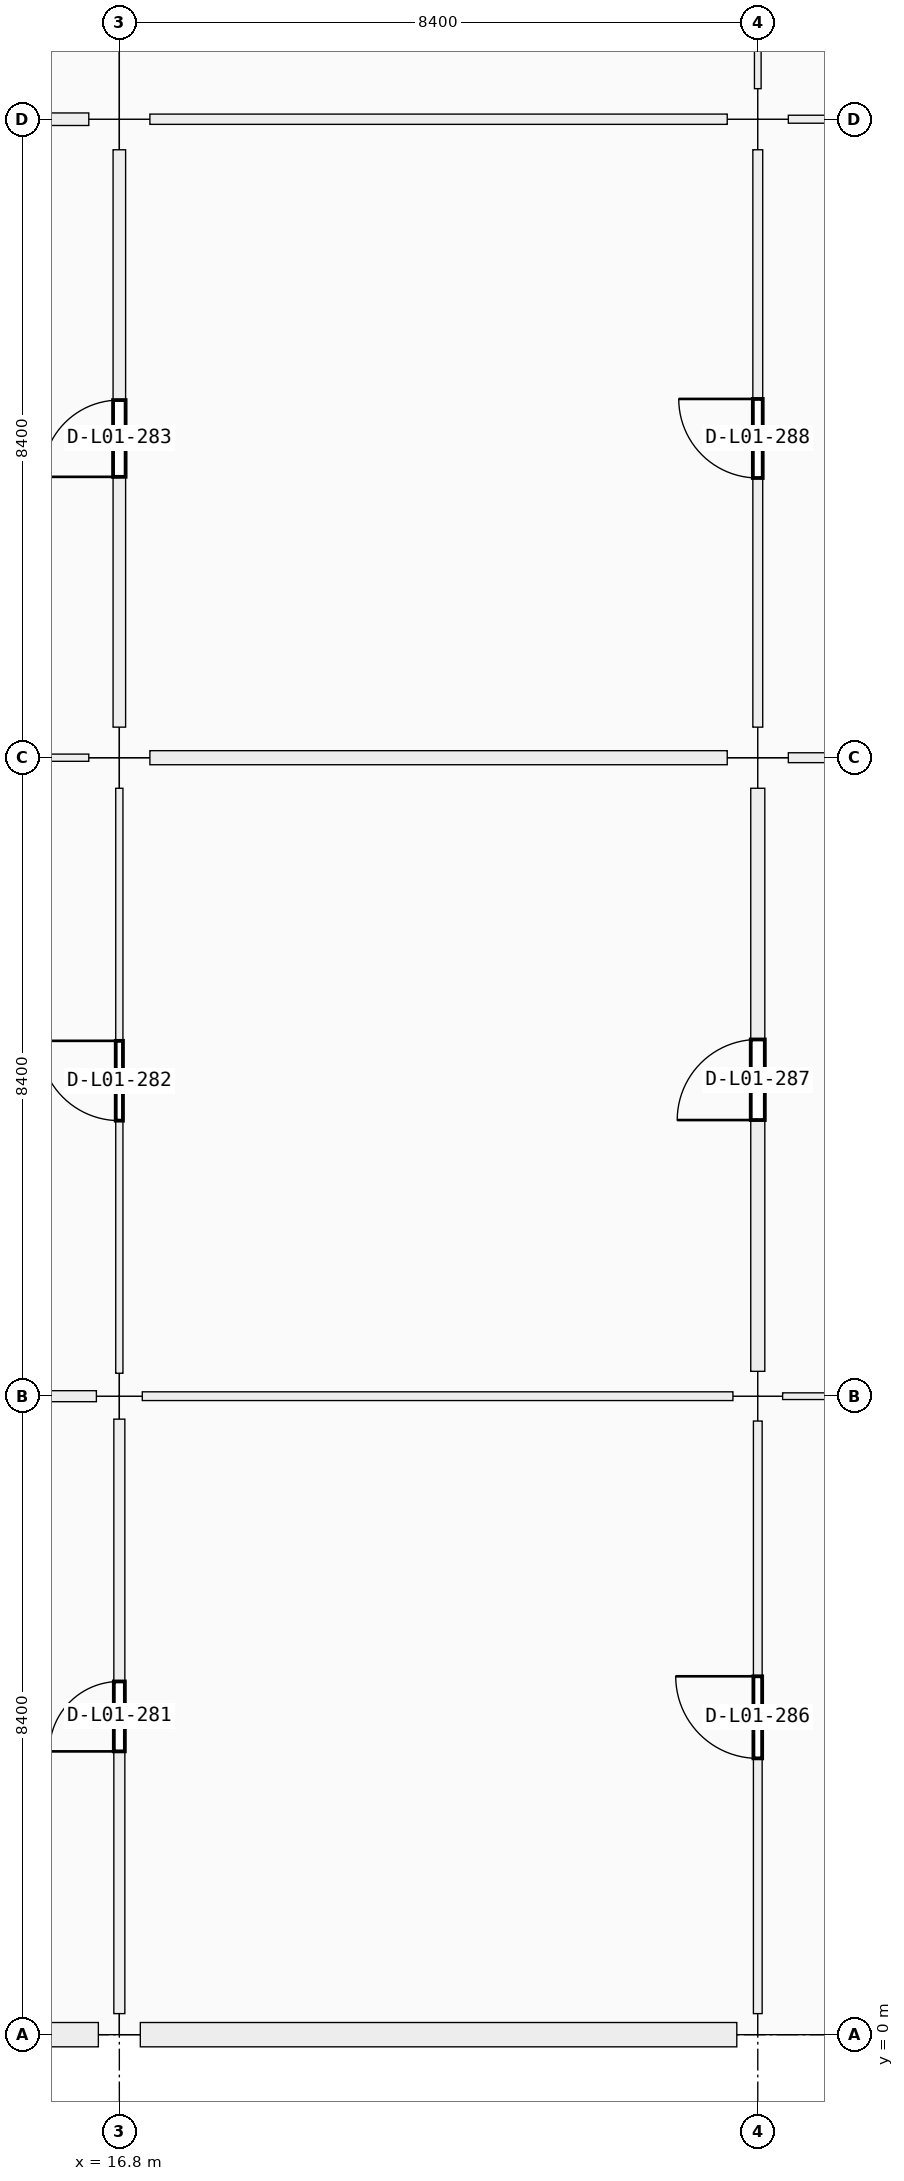
"""IFC4 building model, lengths in metres.
Left out: names, types, materials, properties, quantities, classifications, styles, units other than length and angle.
Written with IfcOpenShell. Run it as: python <this file> out.ifc"""

import sys

from ifc_helpers import new_model, si_unit, direction, frame, frame_2d, origin, origin_2d, place, context, subcontext, project, spatial, rectangle, extrude, element, fill, save


model = new_model("IFC4")
c1 = context("Model", 3, precision=1e-05, world=origin(), true_north=direction((0.0, 1.0)))
c2 = subcontext(c1, "Body", "Model", "MODEL_VIEW")
j1 = project(units=[si_unit("LENGTHUNIT", "METRE"), si_unit("PLANEANGLEUNIT", "RADIAN")], contexts=[c1])
p1 = place(None, origin())
s1 = spatial("IfcSite", under=j1, at=p1, CompositionType="ELEMENT")
p2 = place(p1, origin())
s2 = spatial("IfcBuilding", under=s1, at=p2, CompositionType="ELEMENT")
p3 = place(p2, frame((0.0, 0.0, 5.76)))
s3 = spatial("IfcBuildingStorey", under=s2, at=p3, CompositionType="ELEMENT", Elevation=5.76)
p4 = place(p3, frame((16.8, 0.0, 0.0), z_axis=(0.0, 0.0, 1.0), x_axis=(1.0, 0.0, 0.0)))
e1 = element("IfcColumn", 1, at=p4, inside=s3, PredefinedType="COLUMN", context=c2, shape_type="SweptSolid", body=[
    extrude(rectangle(XDim=0.55, YDim=0.55, at=origin_2d()), origin(), (0.0, 0.0, 1.0), 4.2),
])
p5 = place(p3, frame((16.8, 8.4, 0.0), z_axis=(0.0, 0.0, 1.0), x_axis=(1.0, 0.0, 0.0)))
e2 = element("IfcColumn", 2, at=p5, inside=s3, PredefinedType="COLUMN", context=c2, shape_type="SweptSolid", body=[
    extrude(rectangle(XDim=0.6, YDim=0.6, at=origin_2d()), origin(), (0.0, 0.0, 1.0), 4.5),
])
for number, where, z_axis, x_axis in (
    (3, (16.8, 16.8, 0.0), (0.0, 0.0, 1.0), (1.0, 0.0, 0.0)),
    (4, (16.8, 25.2, 0.0), (0.0, 0.0, 1.0), (1.0, 0.0, 0.0)),
):
    element("IfcColumn", number, at=place(p3, frame(where, z_axis=z_axis, x_axis=x_axis)), inside=s3, PredefinedType="COLUMN", context=c2, shape_type="SweptSolid", body=[
        extrude(rectangle(XDim=0.8, YDim=0.8, at=origin_2d()), origin(), (0.0, 0.0, 1.0), 4.5),
    ])
p6 = place(p3, frame((25.2, 0.0, 0.0), z_axis=(0.0, 0.0, 1.0), x_axis=(1.0, 0.0, 0.0)))
e5 = element("IfcColumn", 5, at=p6, inside=s3, PredefinedType="COLUMN", context=c2, shape_type="SweptSolid", body=[
    extrude(rectangle(XDim=0.55, YDim=0.55, at=origin_2d()), origin(), (0.0, 0.0, 1.0), 4.2),
])
p7 = place(p3, frame((25.2, 8.4, 0.0), z_axis=(0.0, 0.0, 1.0), x_axis=(1.0, 0.0, 0.0)))
e6 = element("IfcColumn", 6, at=p7, inside=s3, PredefinedType="COLUMN", context=c2, shape_type="SweptSolid", body=[
    extrude(rectangle(XDim=0.65, YDim=0.65, at=origin_2d()), origin(), (0.0, 0.0, 1.0), 4.5),
])
for number, where, z_axis, x_axis in (
    (7, (25.2, 16.8, 0.0), (0.0, 0.0, 1.0), (1.0, 0.0, 0.0)),
    (8, (25.2, 25.2, 0.0), (0.0, 0.0, 1.0), (1.0, 0.0, 0.0)),
):
    element("IfcColumn", number, at=place(p3, frame(where, z_axis=z_axis, x_axis=x_axis)), inside=s3, PredefinedType="COLUMN", context=c2, shape_type="SweptSolid", body=[
        extrude(rectangle(XDim=0.8, YDim=0.8, at=origin_2d()), origin(), (0.0, 0.0, 1.0), 4.5),
    ])
p8 = place(p3, frame((16.524, 0.0, 0.0), z_axis=(0.0, 0.0, 1.0), x_axis=(-1.0, 0.0, 0.0)))
e9 = element("IfcWall", 9, at=p8, inside=s3, PredefinedType="SOLIDWALL", context=c2, shape_type="SweptSolid", body=[
    extrude(rectangle(XDim=7.848, YDim=0.32, at=frame_2d((3.924, 0.0))), origin(), (0.0, 0.0, 1.0), 3.4),
])
p9 = place(p8, frame((3.249, 0.0, 0.9)))
e10 = element("IfcOpeningElement", 10, at=p9, cuts=e9, PredefinedType="OPENING", context=c2, shape_type="SweptSolid", body=[
    extrude(rectangle(XDim=1.35, YDim=1.5, at=frame_2d((0.675, 0.75))), frame((0.0, 0.16, 0.0), z_axis=(0.0, -1.0, 0.0), x_axis=(1.0, 0.0, 0.0)), (0.0, 0.0, 1.0), 0.32),
])
p10 = place(p3, frame((24.924, 0.0, 0.0), z_axis=(0.0, 0.0, 1.0), x_axis=(-1.0, 0.0, 0.0)))
e11 = element("IfcWall", 11, at=p10, inside=s3, PredefinedType="SOLIDWALL", context=c2, shape_type="SweptSolid", body=[
    extrude(rectangle(XDim=7.848, YDim=0.32, at=frame_2d((3.924, 0.0))), origin(), (0.0, 0.0, 1.0), 3.4),
])
p11 = place(p10, frame((3.374, 0.0, 0.9)))
e12 = element("IfcOpeningElement", 12, at=p11, cuts=e11, PredefinedType="OPENING", context=c2, shape_type="SweptSolid", body=[
    extrude(rectangle(XDim=1.1, YDim=1.5, at=frame_2d((0.55, 0.75))), frame((0.0, 0.16, 0.0), z_axis=(0.0, -1.0, 0.0), x_axis=(1.0, 0.0, 0.0)), (0.0, 0.0, 1.0), 0.32),
])
p12 = place(p3, frame((8.727, 8.4, 0.0), z_axis=(0.0, 0.0, 1.0), x_axis=(1.0, 0.0, 0.0)))
e13 = element("IfcWall", 13, at=p12, inside=s3, PredefinedType="PARTITIONING", context=c2, shape_type="SweptSolid", body=[
    extrude(rectangle(XDim=7.771, YDim=0.145, at=frame_2d((3.885, 0.0))), origin(), (0.0, 0.0, 1.0), 2.4),
])
p13 = place(p12, frame((3.415, 0.0, 0.0)))
e14 = element("IfcOpeningElement", 14, at=p13, cuts=e13, PredefinedType="OPENING", context=c2, shape_type="SweptSolid", body=[
    extrude(rectangle(XDim=0.94, YDim=2.15, at=frame_2d((0.47, 1.075))), frame((0.0, 0.073, 0.0), z_axis=(0.0, -1.0, 0.0), x_axis=(1.0, 0.0, 0.0)), (0.0, 0.0, 1.0), 0.145),
])
p14 = place(p3, frame((8.802, 16.8, 0.0), z_axis=(0.0, 0.0, 1.0), x_axis=(1.0, 0.0, 0.0)))
e15 = element("IfcWall", 15, at=p14, inside=s3, PredefinedType="PARTITIONING", context=c2, shape_type="SweptSolid", body=[
    extrude(rectangle(XDim=7.596, YDim=0.095, at=frame_2d((3.798, 0.0))), origin(), (0.0, 0.0, 1.0), 2.4),
])
p15 = place(p14, frame((3.258, 0.0, 0.0)))
e16 = element("IfcOpeningElement", 16, at=p15, cuts=e15, PredefinedType="OPENING", context=c2, shape_type="SweptSolid", body=[
    extrude(rectangle(XDim=1.08, YDim=2.22, at=frame_2d((0.54, 1.11))), frame((0.0, 0.047, 0.0), z_axis=(0.0, -1.0, 0.0), x_axis=(1.0, 0.0, 0.0)), (0.0, 0.0, 1.0), 0.095),
])
p16 = place(p3, frame((8.802, 25.2, 0.0), z_axis=(0.0, 0.0, 1.0), x_axis=(1.0, 0.0, 0.0)))
e17 = element("IfcWall", 17, at=p16, inside=s3, PredefinedType="PARTITIONING", context=c2, shape_type="SweptSolid", body=[
    extrude(rectangle(XDim=7.596, YDim=0.165, at=frame_2d((3.798, 0.0))), origin(), (0.0, 0.0, 1.0), 2.4),
])
p17 = place(p16, frame((3.318, 0.0, 0.0)))
e18 = element("IfcOpeningElement", 18, at=p17, cuts=e17, PredefinedType="OPENING", context=c2, shape_type="SweptSolid", body=[
    extrude(rectangle(XDim=0.96, YDim=2.18, at=frame_2d((0.48, 1.09))), frame((0.0, 0.083, 0.0), z_axis=(0.0, -1.0, 0.0), x_axis=(1.0, 0.0, 0.0)), (0.0, 0.0, 1.0), 0.165),
])
p18 = place(p3, frame((17.102, 8.4, 0.0), z_axis=(0.0, 0.0, 1.0), x_axis=(1.0, 0.0, 0.0)))
e19 = element("IfcWall", 19, at=p18, inside=s3, PredefinedType="PARTITIONING", context=c2, shape_type="SweptSolid", body=[
    extrude(rectangle(XDim=7.771, YDim=0.115, at=frame_2d((3.885, 0.0))), origin(), (0.0, 0.0, 1.0), 2.4),
])
p19 = place(p18, frame((3.361, 0.0, 0.0)))
e20 = element("IfcOpeningElement", 20, at=p19, cuts=e19, PredefinedType="OPENING", context=c2, shape_type="SweptSolid", body=[
    extrude(rectangle(XDim=1.05, YDim=2.12, at=frame_2d((0.525, 1.06))), frame((0.0, 0.058, 0.0), z_axis=(0.0, -1.0, 0.0), x_axis=(1.0, 0.0, 0.0)), (0.0, 0.0, 1.0), 0.115),
])
p20 = place(p3, frame((17.202, 16.8, 0.0), z_axis=(0.0, 0.0, 1.0), x_axis=(1.0, 0.0, 0.0)))
e21 = element("IfcWall", 21, at=p20, inside=s3, PredefinedType="PARTITIONING", context=c2, shape_type="SweptSolid", body=[
    extrude(rectangle(XDim=7.596, YDim=0.185, at=frame_2d((3.798, 0.0))), origin(), (0.0, 0.0, 1.0), 2.4),
])
p21 = place(p20, frame((3.268, 0.0, 0.0)))
e22 = element("IfcOpeningElement", 22, at=p21, cuts=e21, PredefinedType="OPENING", context=c2, shape_type="SweptSolid", body=[
    extrude(rectangle(XDim=1.06, YDim=2.22, at=frame_2d((0.53, 1.11))), frame((0.0, 0.093, 0.0), z_axis=(0.0, -1.0, 0.0), x_axis=(1.0, 0.0, 0.0)), (0.0, 0.0, 1.0), 0.185),
])
p22 = place(p3, frame((17.202, 25.2, 0.0), z_axis=(0.0, 0.0, 1.0), x_axis=(1.0, 0.0, 0.0)))
e23 = element("IfcWall", 23, at=p22, inside=s3, PredefinedType="PARTITIONING", context=c2, shape_type="SweptSolid", body=[
    extrude(rectangle(XDim=7.596, YDim=0.135, at=frame_2d((3.798, 0.0))), origin(), (0.0, 0.0, 1.0), 2.4),
])
p23 = place(p22, frame((3.338, 0.0, 0.0)))
e24 = element("IfcOpeningElement", 24, at=p23, cuts=e23, PredefinedType="OPENING", context=c2, shape_type="SweptSolid", body=[
    extrude(rectangle(XDim=0.92, YDim=2.15, at=frame_2d((0.46, 1.075))), frame((0.0, 0.067, 0.0), z_axis=(0.0, -1.0, 0.0), x_axis=(1.0, 0.0, 0.0)), (0.0, 0.0, 1.0), 0.135),
])
p24 = place(p3, frame((25.527, 8.4, 0.0), z_axis=(0.0, 0.0, 1.0), x_axis=(1.0, 0.0, 0.0)))
e25 = element("IfcWall", 25, at=p24, inside=s3, PredefinedType="PARTITIONING", context=c2, shape_type="SweptSolid", body=[
    extrude(rectangle(XDim=7.771, YDim=0.088, at=frame_2d((3.885, 0.0))), origin(), (0.0, 0.0, 1.0), 2.4),
])
p25 = place(p24, frame((3.381, 0.0, 0.0)))
e26 = element("IfcOpeningElement", 26, at=p25, cuts=e25, PredefinedType="OPENING", context=c2, shape_type="SweptSolid", body=[
    extrude(rectangle(XDim=1.01, YDim=2.12, at=frame_2d((0.505, 1.06))), frame((0.0, 0.044, 0.0), z_axis=(0.0, -1.0, 0.0), x_axis=(1.0, 0.0, 0.0)), (0.0, 0.0, 1.0), 0.088),
])
p26 = place(p3, frame((25.602, 16.8, 0.0), z_axis=(0.0, 0.0, 1.0), x_axis=(1.0, 0.0, 0.0)))
e27 = element("IfcWall", 27, at=p26, inside=s3, PredefinedType="MOVABLE", context=c2, shape_type="SweptSolid", body=[
    extrude(rectangle(XDim=7.596, YDim=0.13, at=frame_2d((3.798, 0.0))), origin(), (0.0, 0.0, 1.0), 2.4),
])
p27 = place(p26, frame((3.313, 0.0, 0.0)))
e28 = element("IfcOpeningElement", 28, at=p27, cuts=e27, PredefinedType="OPENING", context=c2, shape_type="SweptSolid", body=[
    extrude(rectangle(XDim=0.97, YDim=2.12, at=frame_2d((0.485, 1.06))), frame((0.0, 0.065, 0.0), z_axis=(0.0, -1.0, 0.0), x_axis=(1.0, 0.0, 0.0)), (0.0, 0.0, 1.0), 0.13),
])
p28 = place(p3, frame((25.602, 25.2, 0.0), z_axis=(0.0, 0.0, 1.0), x_axis=(1.0, 0.0, 0.0)))
e29 = element("IfcWall", 29, at=p28, inside=s3, PredefinedType="PARTITIONING", context=c2, shape_type="SweptSolid", body=[
    extrude(rectangle(XDim=7.596, YDim=0.105, at=frame_2d((3.798, 0.0))), origin(), (0.0, 0.0, 1.0), 2.4),
])
p29 = place(p28, frame((3.278, 0.0, 0.0)))
e30 = element("IfcOpeningElement", 30, at=p29, cuts=e29, PredefinedType="OPENING", context=c2, shape_type="SweptSolid", body=[
    extrude(rectangle(XDim=1.04, YDim=2.2, at=frame_2d((0.52, 1.1))), frame((0.0, 0.052, 0.0), z_axis=(0.0, -1.0, 0.0), x_axis=(1.0, 0.0, 0.0)), (0.0, 0.0, 1.0), 0.105),
])
p30 = place(p3, frame((16.8, 0.277, 0.0), z_axis=(0.0, 0.0, 1.0), x_axis=(0.0, 1.0, 0.0)))
e31 = element("IfcWall", 31, at=p30, inside=s3, PredefinedType="PARTITIONING", context=c2, shape_type="SweptSolid", body=[
    extrude(rectangle(XDim=7.821, YDim=0.145, at=frame_2d((3.91, 0.0))), origin(), (0.0, 0.0, 1.0), 2.4),
])
p31 = place(p30, frame((3.45, 0.0, 0.0)))
e32 = element("IfcOpeningElement", 32, at=p31, cuts=e31, PredefinedType="OPENING", context=c2, shape_type="SweptSolid", body=[
    extrude(rectangle(XDim=0.92, YDim=2.15, at=frame_2d((0.46, 1.075))), frame((0.0, 0.073, 0.0), z_axis=(0.0, -1.0, 0.0), x_axis=(1.0, 0.0, 0.0)), (0.0, 0.0, 1.0), 0.145),
])
p32 = place(p3, frame((16.8, 8.702, 0.0), z_axis=(0.0, 0.0, 1.0), x_axis=(0.0, 1.0, 0.0)))
e33 = element("IfcWall", 33, at=p32, inside=s3, PredefinedType="PARTITIONING", context=c2, shape_type="SweptSolid", body=[
    extrude(rectangle(XDim=7.696, YDim=0.095, at=frame_2d((3.848, 0.0))), origin(), (0.0, 0.0, 1.0), 2.4),
])
p33 = place(p32, frame((3.323, 0.0, 0.0)))
e34 = element("IfcOpeningElement", 34, at=p33, cuts=e33, PredefinedType="OPENING", context=c2, shape_type="SweptSolid", body=[
    extrude(rectangle(XDim=1.05, YDim=2.12, at=frame_2d((0.525, 1.06))), frame((0.0, 0.047, 0.0), z_axis=(0.0, -1.0, 0.0), x_axis=(1.0, 0.0, 0.0)), (0.0, 0.0, 1.0), 0.095),
])
p34 = place(p3, frame((16.8, 17.202, 0.0), z_axis=(0.0, 0.0, 1.0), x_axis=(0.0, 1.0, 0.0)))
e35 = element("IfcWall", 35, at=p34, inside=s3, PredefinedType="PARTITIONING", context=c2, shape_type="SweptSolid", body=[
    extrude(rectangle(XDim=7.596, YDim=0.165, at=frame_2d((3.798, 0.0))), origin(), (0.0, 0.0, 1.0), 2.4),
])
p35 = place(p34, frame((3.293, 0.0, 0.0)))
e36 = element("IfcOpeningElement", 36, at=p35, cuts=e35, PredefinedType="OPENING", context=c2, shape_type="SweptSolid", body=[
    extrude(rectangle(XDim=1.01, YDim=2.12, at=frame_2d((0.505, 1.06))), frame((0.0, 0.083, 0.0), z_axis=(0.0, -1.0, 0.0), x_axis=(1.0, 0.0, 0.0)), (0.0, 0.0, 1.0), 0.165),
])
p36 = place(p3, frame((25.2, 0.277, 0.0), z_axis=(0.0, 0.0, 1.0), x_axis=(0.0, 1.0, 0.0)))
e37 = element("IfcWall", 37, at=p36, inside=s3, PredefinedType="PARTITIONING", context=c2, shape_type="SweptSolid", body=[
    extrude(rectangle(XDim=7.796, YDim=0.115, at=frame_2d((3.898, 0.0))), origin(), (0.0, 0.0, 1.0), 2.4),
])
p37 = place(p36, frame((3.358, 0.0, 0.0)))
e38 = element("IfcOpeningElement", 38, at=p37, cuts=e37, PredefinedType="OPENING", context=c2, shape_type="SweptSolid", body=[
    extrude(rectangle(XDim=1.08, YDim=2.22, at=frame_2d((0.54, 1.11))), frame((0.0, 0.058, 0.0), z_axis=(0.0, -1.0, 0.0), x_axis=(1.0, 0.0, 0.0)), (0.0, 0.0, 1.0), 0.115),
])
p38 = place(p3, frame((25.2, 8.727, 0.0), z_axis=(0.0, 0.0, 1.0), x_axis=(0.0, 1.0, 0.0)))
e39 = element("IfcWall", 39, at=p38, inside=s3, PredefinedType="PARTITIONING", context=c2, shape_type="SweptSolid", body=[
    extrude(rectangle(XDim=7.671, YDim=0.185, at=frame_2d((3.835, 0.0))), origin(), (0.0, 0.0, 1.0), 2.4),
])
p39 = place(p38, frame((3.306, 0.0, 0.0)))
e40 = element("IfcOpeningElement", 40, at=p39, cuts=e39, PredefinedType="OPENING", context=c2, shape_type="SweptSolid", body=[
    extrude(rectangle(XDim=1.06, YDim=2.22, at=frame_2d((0.53, 1.11))), frame((0.0, 0.093, 0.0), z_axis=(0.0, -1.0, 0.0), x_axis=(1.0, 0.0, 0.0)), (0.0, 0.0, 1.0), 0.185),
])
p40 = place(p3, frame((25.2, 17.202, 0.0), z_axis=(0.0, 0.0, 1.0), x_axis=(0.0, 1.0, 0.0)))
e41 = element("IfcWall", 41, at=p40, inside=s3, PredefinedType="MOVABLE", context=c2, shape_type="SweptSolid", body=[
    extrude(rectangle(XDim=7.596, YDim=0.13, at=frame_2d((3.798, 0.0))), origin(), (0.0, 0.0, 1.0), 2.4),
])
p41 = place(p40, frame((3.278, 0.0, 0.0)))
e42 = element("IfcOpeningElement", 42, at=p41, cuts=e41, PredefinedType="OPENING", context=c2, shape_type="SweptSolid", body=[
    extrude(rectangle(XDim=1.04, YDim=2.2, at=frame_2d((0.52, 1.1))), frame((0.0, 0.065, 0.0), z_axis=(0.0, -1.0, 0.0), x_axis=(1.0, 0.0, 0.0)), (0.0, 0.0, 1.0), 0.13),
])
p42 = place(p3, frame((25.2, 25.602, 0.0), z_axis=(0.0, 0.0, 1.0), x_axis=(0.0, 1.0, 0.0)))
e43 = element("IfcWall", 43, at=p42, inside=s3, PredefinedType="PARTITIONING", context=c2, shape_type="SweptSolid", body=[
    extrude(rectangle(XDim=7.596, YDim=0.088, at=frame_2d((3.798, 0.0))), origin(), (0.0, 0.0, 1.0), 2.4),
])
p43 = place(p42, frame((3.268, 0.0, 0.0)))
e44 = element("IfcOpeningElement", 44, at=p43, cuts=e43, PredefinedType="OPENING", context=c2, shape_type="SweptSolid", body=[
    extrude(rectangle(XDim=1.06, YDim=2.22, at=frame_2d((0.53, 1.11))), frame((0.0, 0.044, 0.0), z_axis=(0.0, -1.0, 0.0), x_axis=(1.0, 0.0, 0.0)), (0.0, 0.0, 1.0), 0.088),
])
p44 = place(p11, origin())
e45 = element("IfcWindow", 45, at=p44, inside=s3, PartitioningType="SINGLE_PANEL", PredefinedType="WINDOW", context=c2, shape_type="SweptSolid", body=[
    extrude(rectangle(XDim=1.1, YDim=1.5, at=frame_2d((0.55, 0.75))), frame((0.0, 0.03, 0.0), z_axis=(0.0, -1.0, 0.0), x_axis=(1.0, 0.0, 0.0)), (0.0, 0.0, 1.0), 0.06),
])
fill(e12, e45)
p45 = place(p23, origin())
e46 = element("IfcDoor", 46, at=p45, inside=s3, OperationType="SINGLE_SWING_RIGHT", PredefinedType="DOOR", context=c2, shape_type="SweptSolid", body=[
    extrude(rectangle(XDim=0.92, YDim=2.15, at=frame_2d((0.46, 1.075))), frame((0.0, 0.025, 0.0), z_axis=(0.0, -1.0, 0.0), x_axis=(1.0, 0.0, 0.0)), (0.0, 0.0, 1.0), 0.05),
])
fill(e24, e46)
p46 = place(p19, origin())
e47 = element("IfcDoor", 47, at=p46, inside=s3, OperationType="SINGLE_SWING_RIGHT", PredefinedType="DOOR", context=c2, shape_type="SweptSolid", body=[
    extrude(rectangle(XDim=1.05, YDim=2.12, at=frame_2d((0.525, 1.06))), frame((0.0, 0.025, 0.0), z_axis=(0.0, -1.0, 0.0), x_axis=(1.0, 0.0, 0.0)), (0.0, 0.0, 1.0), 0.05),
])
fill(e20, e47)
p47 = place(p21, origin())
e48 = element("IfcDoor", 48, at=p47, inside=s3, OperationType="SINGLE_SWING_LEFT", PredefinedType="DOOR", context=c2, shape_type="SweptSolid", body=[
    extrude(rectangle(XDim=1.06, YDim=2.22, at=frame_2d((0.53, 1.11))), frame((0.0, 0.025, 0.0), z_axis=(0.0, -1.0, 0.0), x_axis=(1.0, 0.0, 0.0)), (0.0, 0.0, 1.0), 0.05),
])
fill(e22, e48)
p48 = place(p31, origin())
e49 = element("IfcDoor", 49, at=p48, inside=s3, OperationType="SINGLE_SWING_LEFT", PredefinedType="DOOR", context=c2, shape_type="SweptSolid", body=[
    extrude(rectangle(XDim=0.92, YDim=2.15, at=frame_2d((0.46, 1.075))), frame((0.0, 0.025, 0.0), z_axis=(0.0, -1.0, 0.0), x_axis=(1.0, 0.0, 0.0)), (0.0, 0.0, 1.0), 0.05),
])
fill(e32, e49)
p49 = place(p33, origin())
e50 = element("IfcDoor", 50, at=p49, inside=s3, OperationType="SINGLE_SWING_RIGHT", PredefinedType="DOOR", context=c2, shape_type="SweptSolid", body=[
    extrude(rectangle(XDim=1.05, YDim=2.12, at=frame_2d((0.525, 1.06))), frame((0.0, 0.025, 0.0), z_axis=(0.0, -1.0, 0.0), x_axis=(1.0, 0.0, 0.0)), (0.0, 0.0, 1.0), 0.05),
])
fill(e34, e50)
p50 = place(p35, origin())
e51 = element("IfcDoor", 51, at=p50, inside=s3, OperationType="SINGLE_SWING_LEFT", PredefinedType="DOOR", context=c2, shape_type="SweptSolid", body=[
    extrude(rectangle(XDim=1.01, YDim=2.12, at=frame_2d((0.505, 1.06))), frame((0.0, 0.025, 0.0), z_axis=(0.0, -1.0, 0.0), x_axis=(1.0, 0.0, 0.0)), (0.0, 0.0, 1.0), 0.05),
])
fill(e36, e51)
p51 = place(p37, origin())
e52 = element("IfcDoor", 52, at=p51, inside=s3, OperationType="SINGLE_SWING_RIGHT", PredefinedType="DOOR", context=c2, shape_type="SweptSolid", body=[
    extrude(rectangle(XDim=1.08, YDim=2.22, at=frame_2d((0.54, 1.11))), frame((0.0, 0.025, 0.0), z_axis=(0.0, -1.0, 0.0), x_axis=(1.0, 0.0, 0.0)), (0.0, 0.0, 1.0), 0.05),
])
fill(e38, e52)
p52 = place(p39, origin())
e53 = element("IfcDoor", 53, at=p52, inside=s3, OperationType="SINGLE_SWING_LEFT", PredefinedType="DOOR", context=c2, shape_type="SweptSolid", body=[
    extrude(rectangle(XDim=1.06, YDim=2.22, at=frame_2d((0.53, 1.11))), frame((0.0, 0.025, 0.0), z_axis=(0.0, -1.0, 0.0), x_axis=(1.0, 0.0, 0.0)), (0.0, 0.0, 1.0), 0.05),
])
fill(e40, e53)
p53 = place(p41, origin())
e54 = element("IfcDoor", 54, at=p53, inside=s3, OperationType="SINGLE_SWING_RIGHT", PredefinedType="DOOR", context=c2, shape_type="SweptSolid", body=[
    extrude(rectangle(XDim=1.04, YDim=2.2, at=frame_2d((0.52, 1.1))), frame((0.0, 0.025, 0.0), z_axis=(0.0, -1.0, 0.0), x_axis=(1.0, 0.0, 0.0)), (0.0, 0.0, 1.0), 0.05),
])
fill(e42, e54)
save(model, sys.argv[1])
